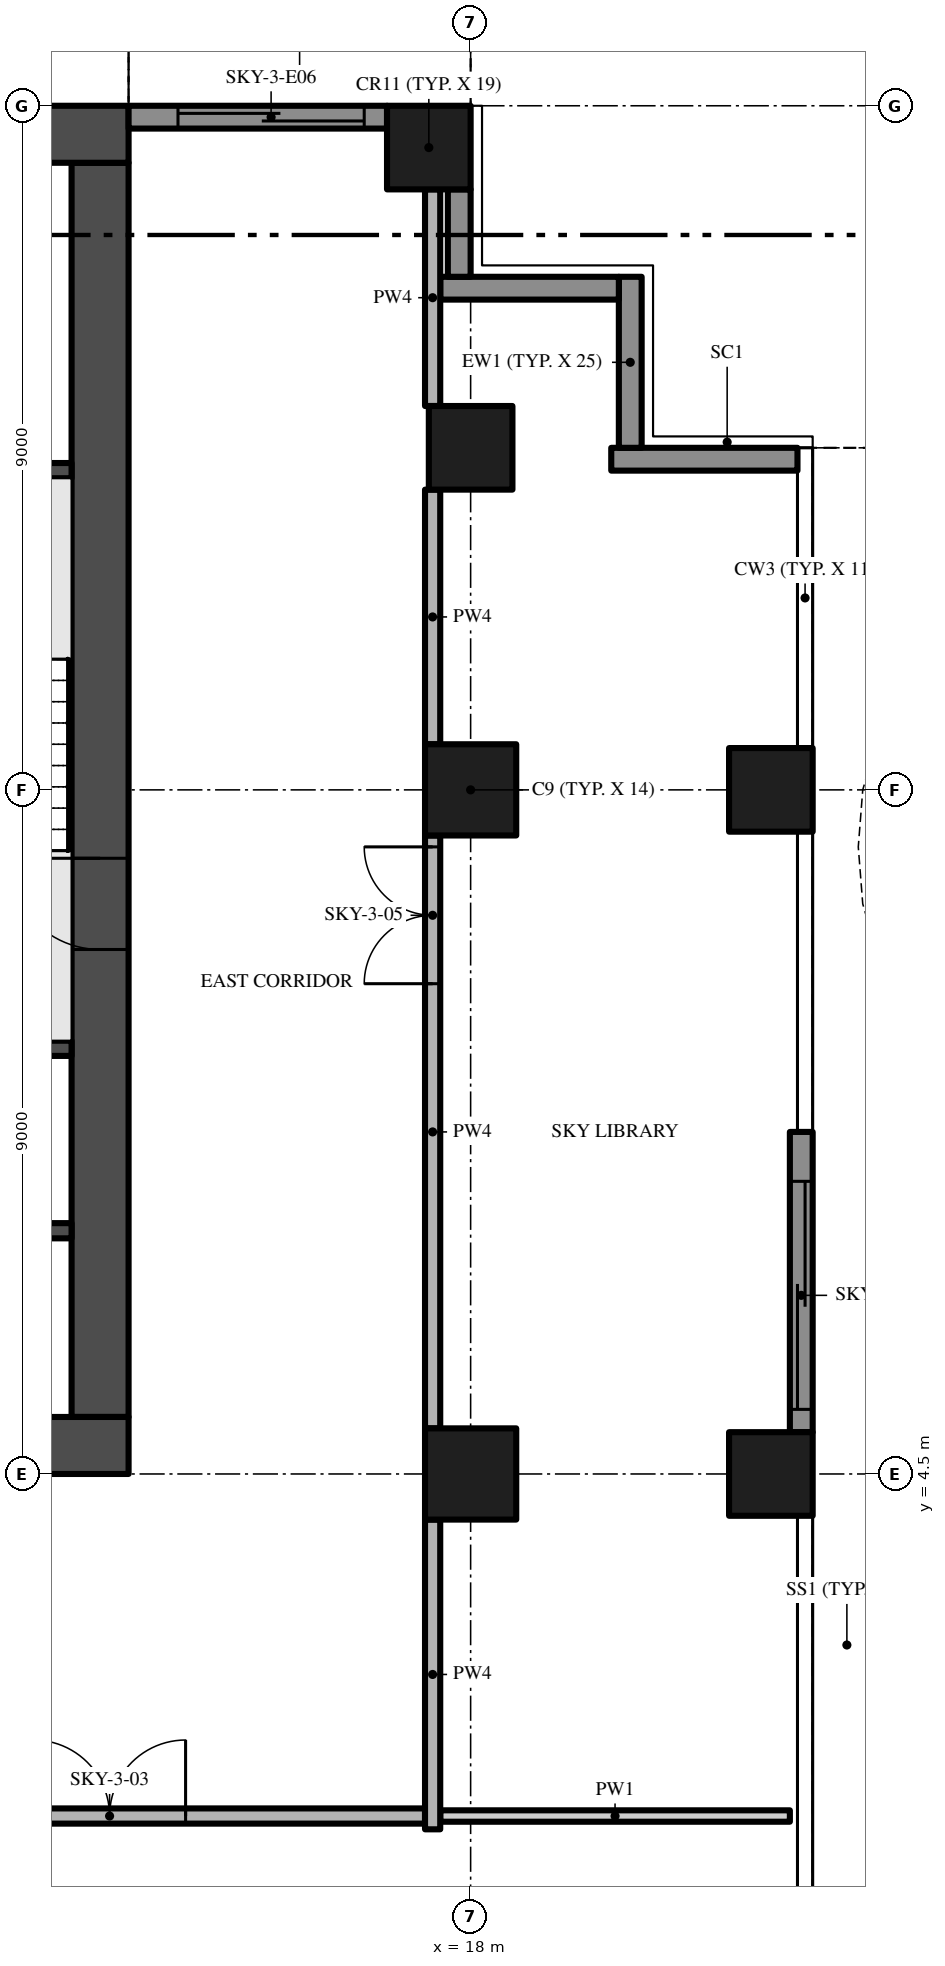
"""IFC4 building model, lengths in metres.
Left out: names, types, materials, properties, quantities, classifications, styles, units other than length and angle.
Written with IfcOpenShell. Run it as: python <this file> out.ifc"""

import sys

from ifc_helpers import new_model, si_unit, direction, frame, frame_2d, origin, origin_2d, place, context, subcontext, project, spatial, polyline, rectangle, outline, extrude, element, fill, save


model = new_model("IFC4")
c1 = context("Model", 3, precision=1e-05, world=origin(), true_north=direction((0.0, 1.0)))
c2 = subcontext(c1, "Body", "Model", "MODEL_VIEW")
j1 = project(units=[si_unit("LENGTHUNIT", "METRE"), si_unit("PLANEANGLEUNIT", "RADIAN")], contexts=[c1])
p1 = place(None, origin())
s1 = spatial("IfcSite", under=j1, at=p1, CompositionType="ELEMENT")
p2 = place(p1, origin())
s2 = spatial("IfcBuilding", under=s1, at=p2, CompositionType="ELEMENT")
p3 = place(p2, frame((0.0, 0.0, 174.4)))
s3 = spatial("IfcBuildingStorey", under=s2, at=p3, CompositionType="ELEMENT", Elevation=174.4)
p4 = place(p3, frame((-13.5, 4.875, -0.3), z_axis=(0.0, 0.0, 1.0), x_axis=(1.0, 0.0, 0.0)))
e1 = element("IfcWall", 1, at=p4, inside=s3, PredefinedType="SHEAR", context=c2, shape_type="SweptSolid", body=[
    extrude(rectangle(XDim=27.0, YDim=0.75, at=frame_2d((13.5, 0.0))), origin(), (0.0, 0.0, 1.0), 5.0),
])
p5 = place(p4, frame((12.0, 0.0, 0.3)))
e2 = element("IfcOpeningElement", 2, at=p5, cuts=e1, PredefinedType="OPENING", context=c2, shape_type="SweptSolid", body=[
    extrude(rectangle(XDim=3.0, YDim=2.4, at=frame_2d((1.5, 1.2))), frame((0.0, 0.385, 0.0), z_axis=(0.0, -1.0, 0.0), x_axis=(1.0, 0.0, 0.0)), (0.0, 0.0, 1.0), 0.77),
])
p6 = place(p4, frame((4.9, 0.0, 0.3)))
e3 = element("IfcOpeningElement", 3, at=p6, cuts=e1, PredefinedType="OPENING", context=c2, shape_type="SweptSolid", body=[
    extrude(rectangle(XDim=1.2, YDim=2.2, at=frame_2d((0.6, 1.1))), frame((0.0, 0.385, 0.0), z_axis=(0.0, -1.0, 0.0), x_axis=(1.0, 0.0, 0.0)), (0.0, 0.0, 1.0), 0.77),
])
p7 = place(p4, frame((20.75, 0.0, 0.3)))
e4 = element("IfcOpeningElement", 4, at=p7, cuts=e1, PredefinedType="OPENING", context=c2, shape_type="SweptSolid", body=[
    extrude(rectangle(XDim=1.5, YDim=2.2, at=frame_2d((0.75, 1.1))), frame((0.0, 0.385, 0.0), z_axis=(0.0, -1.0, 0.0), x_axis=(1.0, 0.0, 0.0)), (0.0, 0.0, 1.0), 0.77),
])
p8 = place(p4, frame((17.4, 0.0, 0.3)))
e5 = element("IfcOpeningElement", 5, at=p8, cuts=e1, PredefinedType="OPENING", context=c2, shape_type="SweptSolid", body=[
    extrude(rectangle(XDim=1.2, YDim=2.2, at=frame_2d((0.6, 1.1))), frame((0.0, 0.385, 0.0), z_axis=(0.0, -1.0, 0.0), x_axis=(1.0, 0.0, 0.0)), (0.0, 0.0, 1.0), 0.77),
])
p9 = place(p3, frame((13.125, 5.25, -0.3), z_axis=(0.0, 0.0, 1.0), x_axis=(0.0, 1.0, 0.0)))
e6 = element("IfcWall", 6, at=p9, inside=s3, PredefinedType="SHEAR", context=c2, shape_type="SweptSolid", body=[
    extrude(rectangle(XDim=16.5, YDim=0.75, at=frame_2d((8.25, 0.0))), origin(), (0.0, 0.0, 1.0), 5.0),
])
p10 = place(p9, frame((6.15, 0.0, 0.3)))
e7 = element("IfcOpeningElement", 7, at=p10, cuts=e6, PredefinedType="OPENING", context=c2, shape_type="SweptSolid", body=[
    extrude(rectangle(XDim=1.2, YDim=2.2, at=frame_2d((0.6, 1.1))), frame((0.0, 0.385, 0.0), z_axis=(0.0, -1.0, 0.0), x_axis=(1.0, 0.0, 0.0)), (0.0, 0.0, 1.0), 0.77),
])
p11 = place(p3, frame((13.5, 22.125, -0.3), z_axis=(0.0, 0.0, 1.0), x_axis=(-1.0, 0.0, 0.0)))
e8 = element("IfcWall", 8, at=p11, inside=s3, PredefinedType="SHEAR", context=c2, shape_type="SweptSolid", body=[
    extrude(rectangle(XDim=27.0, YDim=0.75, at=frame_2d((13.5, 0.0))), origin(), (0.0, 0.0, 1.0), 5.0),
])
p12 = place(p3, frame((18.0, 13.5, 0.0), z_axis=(0.0, 0.0, 1.0), x_axis=(1.0, 0.0, 0.0)))
e9 = element("IfcColumn", 9, at=p12, inside=s3, PredefinedType="COLUMN", context=c2, shape_type="SweptSolid", body=[
    extrude(rectangle(XDim=1.2, YDim=1.2, at=origin_2d()), origin(), (0.0, 0.0, 1.0), 4.7),
])
p13 = place(p3, frame((17.45, 21.95, 0.0), z_axis=(0.0, 0.0, 1.0), x_axis=(1.0, 0.0, 0.0)))
e10 = element("IfcColumn", 10, at=p13, inside=s3, PredefinedType="COLUMN", context=c2, shape_type="SweptSolid", body=[
    extrude(rectangle(XDim=1.1, YDim=1.1, at=origin_2d()), origin(), (0.0, 0.0, 1.0), 4.7),
])
p14 = place(p3, frame((18.0, 4.5, 0.0), z_axis=(0.0, 0.0, 1.0), x_axis=(1.0, 0.0, 0.0)))
e11 = element("IfcColumn", 11, at=p14, inside=s3, PredefinedType="COLUMN", context=c2, shape_type="SweptSolid", body=[
    extrude(rectangle(XDim=1.2, YDim=1.2, at=origin_2d()), origin(), (0.0, 0.0, 1.0), 4.7),
])
for number, where, z_axis, x_axis in (
    (12, (21.95, 13.5, 0.0), (0.0, 0.0, 1.0), (1.0, 0.0, 0.0)),
    (13, (18.0, 18.0, 0.0), (0.0, 0.0, 1.0), (1.0, 0.0, 0.0)),
    (14, (21.95, 4.5, 0.0), (0.0, 0.0, 1.0), (1.0, 0.0, 0.0)),
):
    element("IfcColumn", number, at=place(p3, frame(where, z_axis=z_axis, x_axis=x_axis)), inside=s3, PredefinedType="COLUMN", context=c2, shape_type="SweptSolid", body=[
        extrude(rectangle(XDim=1.1, YDim=1.1, at=origin_2d()), origin(), (0.0, 0.0, 1.0), 4.7),
    ])
p15 = place(p3, frame((22.35, 9.0, 0.0), z_axis=(0.0, 0.0, 1.0), x_axis=(0.0, -1.0, 0.0)))
e15 = element("IfcWall", 15, at=p15, inside=s3, PredefinedType="SOLIDWALL", context=c2, shape_type="SweptSolid", body=[
    extrude(rectangle(XDim=3.95, YDim=0.3, at=frame_2d((1.975, 0.0))), origin(), (0.0, 0.0, 1.0), 4.7),
])
p16 = place(p15, frame((0.65, 0.0, 0.0)))
e16 = element("IfcOpeningElement", 16, at=p16, cuts=e15, PredefinedType="OPENING", context=c2, shape_type="SweptSolid", body=[
    extrude(rectangle(XDim=3.0, YDim=2.4, at=frame_2d((1.5, 1.2))), frame((0.0, 0.16, 0.0), z_axis=(0.0, -1.0, 0.0), x_axis=(1.0, 0.0, 0.0)), (0.0, 0.0, 1.0), 0.32),
])
p17 = place(p3, frame((19.85, 17.85, 0.0), z_axis=(0.0, 0.0, 1.0), x_axis=(1.0, 0.0, 0.0)))
e17 = element("IfcWall", 17, at=p17, inside=s3, PredefinedType="SOLIDWALL", context=c2, shape_type="SweptSolid", body=[
    extrude(rectangle(XDim=2.45, YDim=0.3, at=frame_2d((1.225, 0.0))), origin(), (0.0, 0.0, 1.0), 4.7),
])
p18 = place(p3, frame((20.1, 20.25, 0.0), z_axis=(0.0, 0.0, 1.0), x_axis=(0.0, -1.0, 0.0)))
e18 = element("IfcWall", 18, at=p18, inside=s3, PredefinedType="SOLIDWALL", context=c2, shape_type="SweptSolid", body=[
    extrude(rectangle(XDim=2.25, YDim=0.3, at=frame_2d((1.125, 0.0))), origin(), (0.0, 0.0, 1.0), 4.7),
])
p19 = place(p3, frame((17.6, 20.1, 0.0), z_axis=(0.0, 0.0, 1.0), x_axis=(1.0, 0.0, 0.0)))
e19 = element("IfcWall", 19, at=p19, inside=s3, PredefinedType="SOLIDWALL", context=c2, shape_type="SweptSolid", body=[
    extrude(rectangle(XDim=2.35, YDim=0.3, at=frame_2d((1.175, 0.0))), origin(), (0.0, 0.0, 1.0), 4.7),
])
p20 = place(p3, frame((17.85, 21.4, 0.0), z_axis=(0.0, 0.0, 1.0), x_axis=(0.0, -1.0, 0.0)))
e20 = element("IfcWall", 20, at=p20, inside=s3, PredefinedType="SOLIDWALL", context=c2, shape_type="SweptSolid", body=[
    extrude(rectangle(XDim=1.15, YDim=0.3, at=frame_2d((0.575, 0.0))), origin(), (0.0, 0.0, 1.0), 4.7),
])
p21 = place(p3, frame((13.5, 22.35, 0.0), z_axis=(0.0, 0.0, 1.0), x_axis=(1.0, 0.0, 0.0)))
e21 = element("IfcWall", 21, at=p21, inside=s3, PredefinedType="SOLIDWALL", context=c2, shape_type="SweptSolid", body=[
    extrude(rectangle(XDim=3.4, YDim=0.3, at=frame_2d((1.7, 0.0))), origin(), (0.0, 0.0, 1.0), 4.7),
])
p22 = place(p21, frame((0.65, 0.0, 0.0)))
e22 = element("IfcOpeningElement", 22, at=p22, cuts=e21, PredefinedType="OPENING", context=c2, shape_type="SweptSolid", body=[
    extrude(rectangle(XDim=2.45, YDim=2.4, at=frame_2d((1.225, 1.2))), frame((0.0, 0.16, 0.0), z_axis=(0.0, -1.0, 0.0), x_axis=(1.0, 0.0, 0.0)), (0.0, 0.0, 1.0), 0.32),
])
p23 = place(p3, origin())
e23 = element("IfcWall", 23, at=p23, inside=s3, PredefinedType="USERDEFINED", context=c2, shape_type="SweptSolid", body=[
    extrude(outline(polyline([(24.3, -13.5), (25.005, -12.0), (25.441, -10.5), (25.5, -9.75), (25.441, -9.0), (25.005, -7.5), (24.3, -6.0), (23.595, -4.5), (23.159, -3.0), (23.1, -2.25), (23.159, -1.5), (23.595, 0.0), (24.3, 1.5), (25.005, 3.0), (25.441, 4.5), (25.5, 5.25), (25.441, 6.0), (25.005, 7.5), (24.3, 9.0), (23.595, 10.5), (23.159, 12.0), (23.1, 12.75), (23.159, 13.5), (23.595, 15.0), (24.3, 16.5), (25.005, 18.0), (24.779, 18.106), (24.074, 16.606), (23.36, 15.089), (22.911, 13.545), (22.849, 12.75), (22.911, 11.955), (23.36, 10.411), (24.074, 8.894), (24.771, 7.411), (25.194, 5.955), (25.249, 5.25), (25.194, 4.545), (24.771, 3.089), (24.074, 1.606), (23.36, 0.089), (22.911, -1.455), (22.849, -2.25), (22.911, -3.045), (23.36, -4.589), (24.074, -6.106), (24.771, -7.589), (25.194, -9.045), (25.249, -9.75), (25.194, -10.455), (24.771, -11.911), (24.074, -13.394), (24.3, -13.5)])), origin(), (0.0, 0.0, 1.0), 0.9),
])
for number, where, z_axis, x_axis in (
    (24, (9.65, 7.7, 0.0), (0.0, 0.0, 1.0), (1.0, 0.0, 0.0)),
    (25, (9.65, 10.1, 0.0), (0.0, 0.0, 1.0), (1.0, 0.0, 0.0)),
    (26, (9.65, 17.7, 0.0), (0.0, 0.0, 1.0), (1.0, 0.0, 0.0)),
):
    element("IfcWall", number, at=place(p3, frame(where, z_axis=z_axis, x_axis=x_axis)), inside=s3, PredefinedType="SHEAR", context=c2, shape_type="SweptSolid", body=[
        extrude(rectangle(XDim=3.1, YDim=0.2, at=frame_2d((1.55, 0.0))), origin(), (0.0, 0.0, 1.0), 4.7),
    ])
p24 = place(p3, frame((-17.4, 0.0, 0.0), z_axis=(0.0, 0.0, 1.0), x_axis=(1.0, 0.0, 0.0)))
e27 = element("IfcWall", 27, at=p24, inside=s3, PredefinedType="PARTITIONING", context=c2, shape_type="SweptSolid", body=[
    extrude(rectangle(XDim=34.8, YDim=0.2, at=frame_2d((17.4, 0.0))), origin(), (0.0, 0.0, 1.0), 4.7),
])
p25 = place(p24, frame((7.65, 0.0, 0.0)))
e28 = element("IfcOpeningElement", 28, at=p25, cuts=e27, PredefinedType="OPENING", context=c2, shape_type="SweptSolid", body=[
    extrude(rectangle(XDim=2.0, YDim=2.4, at=frame_2d((1.0, 1.2))), frame((0.0, 0.11, 0.0), z_axis=(0.0, -1.0, 0.0), x_axis=(1.0, 0.0, 0.0)), (0.0, 0.0, 1.0), 0.22),
])
p26 = place(p24, frame((20.9, 0.0, 0.0)))
e29 = element("IfcOpeningElement", 29, at=p26, cuts=e27, PredefinedType="OPENING", context=c2, shape_type="SweptSolid", body=[
    extrude(rectangle(XDim=2.0, YDim=2.4, at=frame_2d((1.0, 1.2))), frame((0.0, 0.11, 0.0), z_axis=(0.0, -1.0, 0.0), x_axis=(1.0, 0.0, 0.0)), (0.0, 0.0, 1.0), 0.22),
])
p27 = place(p24, frame((29.65, 0.0, 0.0)))
e30 = element("IfcOpeningElement", 30, at=p27, cuts=e27, PredefinedType="OPENING", context=c2, shape_type="SweptSolid", body=[
    extrude(rectangle(XDim=2.0, YDim=2.4, at=frame_2d((1.0, 1.2))), frame((0.0, 0.11, 0.0), z_axis=(0.0, -1.0, 0.0), x_axis=(1.0, 0.0, 0.0)), (0.0, 0.0, 1.0), 0.22),
])
p28 = place(p3, frame((17.6, 0.0, 0.0), z_axis=(0.0, 0.0, 1.0), x_axis=(1.0, 0.0, 0.0)))
e31 = element("IfcWall", 31, at=p28, inside=s3, PredefinedType="PARTITIONING", context=c2, shape_type="SweptSolid", body=[
    extrude(rectangle(XDim=4.6, YDim=0.15, at=frame_2d((2.3, 0.0))), origin(), (0.0, 0.0, 1.0), 4.7),
])
p29 = place(p3, frame((17.5, -0.175, 0.0), z_axis=(0.0, 0.0, 1.0), x_axis=(0.0, 1.0, 0.0)))
e32 = element("IfcWall", 32, at=p29, inside=s3, PredefinedType="PARTITIONING", context=c2, shape_type="SweptSolid", body=[
    extrude(rectangle(XDim=4.075, YDim=0.2, at=frame_2d((2.038, 0.0))), origin(), (0.0, 0.0, 1.0), 4.7),
])
p30 = place(p3, frame((17.5, 5.1, 0.0), z_axis=(0.0, 0.0, 1.0), x_axis=(0.0, 1.0, 0.0)))
e33 = element("IfcWall", 33, at=p30, inside=s3, PredefinedType="PARTITIONING", context=c2, shape_type="SweptSolid", body=[
    extrude(rectangle(XDim=7.8, YDim=0.2, at=frame_2d((3.9, 0.0))), origin(), (0.0, 0.0, 1.0), 4.7),
])
p31 = place(p30, frame((5.85, 0.0, 0.0)))
e34 = element("IfcOpeningElement", 34, at=p31, cuts=e33, PredefinedType="OPENING", context=c2, shape_type="SweptSolid", body=[
    extrude(rectangle(XDim=1.8, YDim=2.4, at=frame_2d((0.9, 1.2))), frame((0.0, 0.11, 0.0), z_axis=(0.0, -1.0, 0.0), x_axis=(1.0, 0.0, 0.0)), (0.0, 0.0, 1.0), 0.22),
])
p32 = place(p3, frame((17.5, 14.1, 0.0), z_axis=(0.0, 0.0, 1.0), x_axis=(0.0, 1.0, 0.0)))
e35 = element("IfcWall", 35, at=p32, inside=s3, PredefinedType="PARTITIONING", context=c2, shape_type="SweptSolid", body=[
    extrude(rectangle(XDim=3.35, YDim=0.2, at=frame_2d((1.675, 0.0))), origin(), (0.0, 0.0, 1.0), 4.7),
])
p33 = place(p3, frame((17.5, 18.55, 0.0), z_axis=(0.0, 0.0, 1.0), x_axis=(0.0, 1.0, 0.0)))
e36 = element("IfcWall", 36, at=p33, inside=s3, PredefinedType="PARTITIONING", context=c2, shape_type="SweptSolid", body=[
    extrude(rectangle(XDim=2.85, YDim=0.2, at=frame_2d((1.425, 0.0))), origin(), (0.0, 0.0, 1.0), 4.7),
])
p34 = place(p16, origin())
e37 = element("IfcDoor", 37, at=p34, inside=s3, OperationType="SINGLE_SWING_LEFT", PredefinedType="DOOR", context=c2, shape_type="SweptSolid", body=[
    extrude(rectangle(XDim=3.0, YDim=2.4, at=frame_2d((1.5, 1.2))), frame((0.0, 0.025, 0.0), z_axis=(0.0, -1.0, 0.0), x_axis=(1.0, 0.0, 0.0)), (0.0, 0.0, 1.0), 0.05),
])
fill(e16, e37)
p35 = place(p22, origin())
e38 = element("IfcDoor", 38, at=p35, inside=s3, OperationType="SINGLE_SWING_LEFT", PredefinedType="DOOR", context=c2, shape_type="SweptSolid", body=[
    extrude(rectangle(XDim=2.45, YDim=2.4, at=frame_2d((1.225, 1.2))), frame((0.0, 0.025, 0.0), z_axis=(0.0, -1.0, 0.0), x_axis=(1.0, 0.0, 0.0)), (0.0, 0.0, 1.0), 0.05),
])
fill(e22, e38)
p36 = place(p10, frame((1.2, 0.0, 0.0), z_axis=(0.0, 0.0, 1.0), x_axis=(-1.0, 0.0, 0.0)))
e39 = element("IfcDoor", 39, at=p36, inside=s3, OperationType="SINGLE_SWING_LEFT", PredefinedType="DOOR", context=c2, shape_type="SweptSolid", body=[
    extrude(rectangle(XDim=1.2, YDim=2.2, at=frame_2d((0.6, 1.1))), frame((0.0, 0.025, 0.0), z_axis=(0.0, -1.0, 0.0), x_axis=(1.0, 0.0, 0.0)), (0.0, 0.0, 1.0), 0.05),
])
fill(e7, e39)
p37 = place(p27, origin())
e40 = element("IfcDoor", 40, at=p37, inside=s3, OperationType="DOUBLE_DOOR_SINGLE_SWING", PredefinedType="DOOR", context=c2, shape_type="SweptSolid", body=[
    extrude(rectangle(XDim=2.0, YDim=2.4, at=frame_2d((1.0, 1.2))), frame((0.0, 0.025, 0.0), z_axis=(0.0, -1.0, 0.0), x_axis=(1.0, 0.0, 0.0)), (0.0, 0.0, 1.0), 0.05),
])
fill(e30, e40)
p38 = place(p31, origin())
e41 = element("IfcDoor", 41, at=p38, inside=s3, OperationType="DOUBLE_DOOR_SINGLE_SWING", PredefinedType="DOOR", context=c2, shape_type="SweptSolid", body=[
    extrude(rectangle(XDim=1.8, YDim=2.4, at=frame_2d((0.9, 1.2))), frame((0.0, 0.025, 0.0), z_axis=(0.0, -1.0, 0.0), x_axis=(1.0, 0.0, 0.0)), (0.0, 0.0, 1.0), 0.05),
])
fill(e34, e41)
save(model, sys.argv[1])
